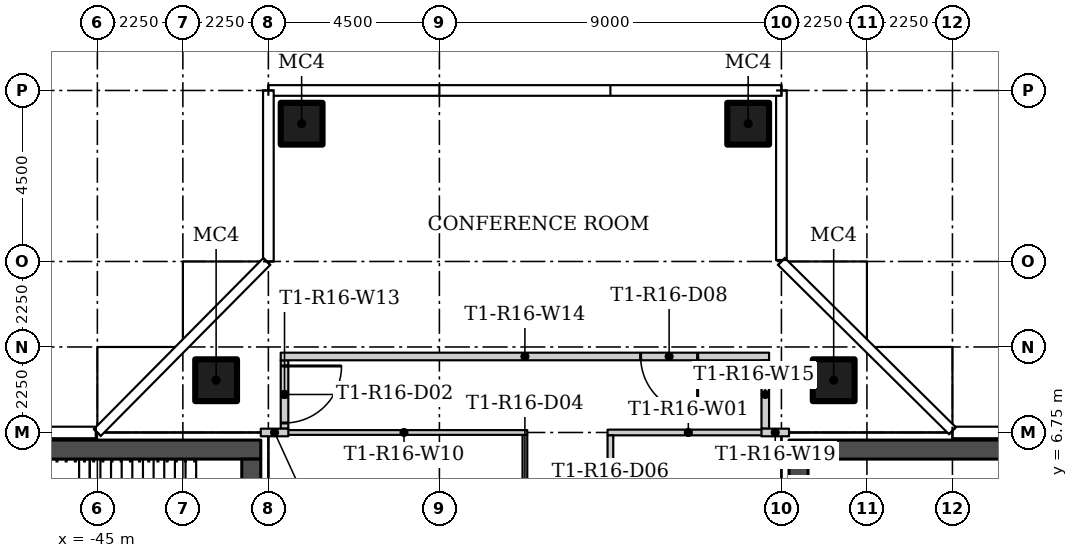
"""IFC4 building model, lengths in metres.
Left out: names, types, materials, properties, quantities, classifications, styles, units other than length and angle.
Written with IfcOpenShell. Run it as: python <this file> out.ifc"""

import sys

from ifc_helpers import new_model, si_unit, direction, frame, frame_2d, origin, origin_2d, place, context, subcontext, project, spatial, rectangle, hollow_rectangle, extrude, element, fill, save


model = new_model("IFC4")
c1 = context("Model", 3, precision=1e-05, world=origin(), true_north=direction((0.0, 1.0)))
c2 = subcontext(c1, "Body", "Model", "MODEL_VIEW")
j1 = project(units=[si_unit("LENGTHUNIT", "METRE"), si_unit("PLANEANGLEUNIT", "RADIAN")], contexts=[c1])
p1 = place(None, origin())
s1 = spatial("IfcSite", under=j1, at=p1, CompositionType="ELEMENT")
p2 = place(p1, origin())
s2 = spatial("IfcBuilding", under=s1, at=p2, CompositionType="ELEMENT")
p3 = place(p2, frame((0.0, 0.0, 146.7)))
s3 = spatial("IfcBuildingStorey", under=s2, at=p3, CompositionType="ELEMENT", Elevation=146.7)
for number, where in (
    (1, (-25.625, 8.125, 0.0)),
    (2, (-41.875, 8.125, 0.0)),
    (3, (-39.625, 14.875, 0.0)),
    (4, (-27.875, 14.875, 0.0)),
):
    element("IfcColumn", number, at=place(p3, frame(where)), inside=s3, PredefinedType="COLUMN", context=c2, shape_type="SweptSolid", body=[
        extrude(hollow_rectangle(XDim=1.1, YDim=1.1, WallThickness=0.04, at=origin_2d()), origin(), (0.0, 0.0, 1.0), 3.55),
    ])
p4 = place(p3, frame((-27.325, 6.75, 0.0), z_axis=(0.0, 0.0, 1.0), x_axis=(-1.0, 0.0, 0.0)))
e5 = element("IfcWall", 5, at=p4, inside=s3, PredefinedType="PARTITIONING", context=c2, shape_type="SweptSolid", body=[
    extrude(rectangle(XDim=4.25, YDim=0.15, at=frame_2d((2.125, 0.0))), origin(), (0.0, 0.0, 1.0), 3.55),
])
p5 = place(p3, frame((-31.5, 6.675, 0.0), z_axis=(0.0, 0.0, 1.0), x_axis=(0.0, -1.0, 0.0)))
e6 = element("IfcWall", 6, at=p5, inside=s3, PredefinedType="PARTITIONING", context=c2, shape_type="SweptSolid", body=[
    extrude(rectangle(XDim=4.15, YDim=0.15, at=frame_2d((2.075, 0.0))), origin(), (0.0, 0.0, 1.0), 3.55),
])
p6 = place(p5, frame((1.625, 0.0, 0.0)))
e7 = element("IfcOpeningElement", 7, at=p6, cuts=e6, PredefinedType="OPENING", context=c2, shape_type="SweptSolid", body=[
    extrude(rectangle(XDim=0.9, YDim=2.1, at=frame_2d((0.45, 1.05))), frame((0.0, 0.085, 0.0), z_axis=(0.0, -1.0, 0.0), x_axis=(1.0, 0.0, 0.0)), (0.0, 0.0, 1.0), 0.17),
])
p7 = place(p3, frame((-33.75, 2.513, 0.0), z_axis=(0.0, 0.0, 1.0), x_axis=(0.0, 1.0, 0.0)))
e8 = element("IfcWall", 8, at=p7, inside=s3, PredefinedType="PARTITIONING", context=c2, shape_type="SweptSolid", body=[
    extrude(rectangle(XDim=4.175, YDim=0.125, at=frame_2d((2.087, 0.0))), origin(), (0.0, 0.0, 1.0), 3.55),
])
p8 = place(p7, frame((1.637, 0.0, 0.0)))
e9 = element("IfcOpeningElement", 9, at=p8, cuts=e8, PredefinedType="OPENING", context=c2, shape_type="SweptSolid", body=[
    extrude(rectangle(XDim=0.9, YDim=2.1, at=frame_2d((0.45, 1.05))), frame((0.0, 0.073, 0.0), z_axis=(0.0, -1.0, 0.0), x_axis=(1.0, 0.0, 0.0)), (0.0, 0.0, 1.0), 0.145),
])
p9 = place(p3, frame((-33.688, 6.75, 0.0), z_axis=(0.0, 0.0, 1.0), x_axis=(-1.0, 0.0, 0.0)))
e10 = element("IfcWall", 10, at=p9, inside=s3, PredefinedType="PARTITIONING", context=c2, shape_type="SweptSolid", body=[
    extrude(rectangle(XDim=6.488, YDim=0.125, at=frame_2d((3.244, 0.0))), origin(), (0.0, 0.0, 1.0), 3.55),
])
p10 = place(p3, frame((-40.075, 8.65, 0.0), z_axis=(0.0, 0.0, 1.0), x_axis=(0.0, -1.0, 0.0)))
e11 = element("IfcWall", 11, at=p10, inside=s3, PredefinedType="PARTITIONING", context=c2, shape_type="SweptSolid", body=[
    extrude(rectangle(XDim=1.8, YDim=0.2, at=frame_2d((0.9, 0.0))), origin(), (0.0, 0.0, 1.0), 3.55),
])
p11 = place(p10, frame((0.15, 0.0, 0.0)))
e12 = element("IfcOpeningElement", 12, at=p11, cuts=e11, PredefinedType="OPENING", context=c2, shape_type="SweptSolid", body=[
    extrude(rectangle(XDim=1.5, YDim=2.4, at=frame_2d((0.75, 1.2))), frame((0.0, 0.11, 0.0), z_axis=(0.0, -1.0, 0.0), x_axis=(1.0, 0.0, 0.0)), (0.0, 0.0, 1.0), 0.22),
])
p12 = place(p3, frame((-27.325, 8.75, 0.0), z_axis=(0.0, 0.0, 1.0), x_axis=(-1.0, 0.0, 0.0)))
e13 = element("IfcWall", 13, at=p12, inside=s3, PredefinedType="PARTITIONING", context=c2, shape_type="SweptSolid", body=[
    extrude(rectangle(XDim=12.851, YDim=0.2, at=frame_2d((6.425, 0.0))), origin(), (0.0, 0.0, 1.0), 3.55),
])
p13 = place(p12, frame((1.88, 0.0, 0.0)))
e14 = element("IfcOpeningElement", 14, at=p13, cuts=e13, PredefinedType="OPENING", context=c2, shape_type="SweptSolid", body=[
    extrude(rectangle(XDim=1.5, YDim=2.4, at=frame_2d((0.75, 1.2))), frame((0.0, 0.11, 0.0), z_axis=(0.0, -1.0, 0.0), x_axis=(1.0, 0.0, 0.0)), (0.0, 0.0, 1.0), 0.22),
])
p14 = place(p3, frame((-27.425, 6.85, 0.0), z_axis=(0.0, 0.0, 1.0), x_axis=(0.0, 1.0, 0.0)))
e15 = element("IfcWall", 15, at=p14, inside=s3, PredefinedType="PARTITIONING", context=c2, shape_type="SweptSolid", body=[
    extrude(rectangle(XDim=1.8, YDim=0.2, at=frame_2d((0.9, 0.0))), origin(), (0.0, 0.0, 1.0), 3.55),
])
for number, where, z_axis, x_axis in (
    (16, (-26.8, 6.75, 0.0), (0.0, 0.0, 1.0), (-1.0, 0.0, 0.0)),
    (17, (-39.975, 6.75, 0.0), (0.0, 0.0, 1.0), (-1.0, 0.0, 0.0)),
):
    element("IfcWall", number, at=place(p3, frame(where, z_axis=z_axis, x_axis=x_axis)), inside=s3, PredefinedType="PARTITIONING", context=c2, shape_type="SweptSolid", body=[
        extrude(rectangle(XDim=0.725, YDim=0.2, at=frame_2d((0.362, 0.0))), origin(), (0.0, 0.0, 1.0), 3.55),
    ])
p15 = place(p3, frame((-26.8, 6.3, 0.0)))
e18 = element("IfcWall", 18, at=p15, inside=s3, PredefinedType="SHEAR", context=c2, shape_type="SweptSolid", body=[
    extrude(rectangle(XDim=13.1, YDim=0.5, at=frame_2d((6.55, 0.0))), origin(), (0.0, 0.0, 1.0), 3.55),
])
p16 = place(p3, frame((-26.55, 6.05, 0.0), z_axis=(0.0, 0.0, 1.0), x_axis=(0.0, -1.0, 0.0)))
e19 = element("IfcWall", 19, at=p16, inside=s3, PredefinedType="SHEAR", context=c2, shape_type="SweptSolid", body=[
    extrude(rectangle(XDim=12.1, YDim=0.5, at=frame_2d((6.05, 0.0))), origin(), (0.0, 0.0, 1.0), 3.55),
])
p17 = place(p16, frame((3.9, 0.0, 0.0)))
e20 = element("IfcOpeningElement", 20, at=p17, cuts=e19, PredefinedType="OPENING", context=c2, shape_type="SweptSolid", body=[
    extrude(rectangle(XDim=1.8, YDim=2.4, at=frame_2d((0.9, 1.2))), frame((0.0, 0.26, 0.0), z_axis=(0.0, -1.0, 0.0), x_axis=(1.0, 0.0, 0.0)), (0.0, 0.0, 1.0), 0.52),
])
p18 = place(p3, frame((-40.7, 6.3, 0.0), z_axis=(0.0, 0.0, 1.0), x_axis=(-1.0, 0.0, 0.0)))
e21 = element("IfcWall", 21, at=p18, inside=s3, PredefinedType="SHEAR", context=c2, shape_type="SweptSolid", body=[
    extrude(rectangle(XDim=13.1, YDim=0.5, at=frame_2d((6.55, 0.0))), origin(), (0.0, 0.0, 1.0), 3.55),
])
p19 = place(p3, frame((-40.95, -6.05, 0.0), z_axis=(0.0, 0.0, 1.0), x_axis=(0.0, 1.0, 0.0)))
e22 = element("IfcWall", 22, at=p19, inside=s3, PredefinedType="SHEAR", context=c2, shape_type="SweptSolid", body=[
    extrude(rectangle(XDim=12.1, YDim=0.5, at=frame_2d((6.05, 0.0))), origin(), (0.0, 0.0, 1.0), 3.55),
])
p20 = place(p19, frame((6.4, 0.0, 0.0)))
e23 = element("IfcOpeningElement", 23, at=p20, cuts=e22, PredefinedType="OPENING", context=c2, shape_type="SweptSolid", body=[
    extrude(rectangle(XDim=1.8, YDim=2.4, at=frame_2d((0.9, 1.2))), frame((0.0, 0.26, 0.0), z_axis=(0.0, -1.0, 0.0), x_axis=(1.0, 0.0, 0.0)), (0.0, 0.0, 1.0), 0.52),
])
p21 = place(p11, origin())
e24 = element("IfcDoor", 24, at=p21, inside=s3, OperationType="DOUBLE_DOOR_SINGLE_SWING", PredefinedType="DOOR", context=c2, shape_type="SweptSolid", body=[
    extrude(rectangle(XDim=1.5, YDim=2.4, at=frame_2d((0.75, 1.2))), frame((0.0, 0.025, 0.0), z_axis=(0.0, -1.0, 0.0), x_axis=(1.0, 0.0, 0.0)), (0.0, 0.0, 1.0), 0.05),
])
fill(e12, e24)
p22 = place(p13, origin())
e25 = element("IfcDoor", 25, at=p22, inside=s3, OperationType="DOUBLE_DOOR_SINGLE_SWING", PredefinedType="DOOR", context=c2, shape_type="SweptSolid", body=[
    extrude(rectangle(XDim=1.5, YDim=2.4, at=frame_2d((0.75, 1.2))), frame((0.0, 0.025, 0.0), z_axis=(0.0, -1.0, 0.0), x_axis=(1.0, 0.0, 0.0)), (0.0, 0.0, 1.0), 0.05),
])
fill(e14, e25)
save(model, sys.argv[1])
